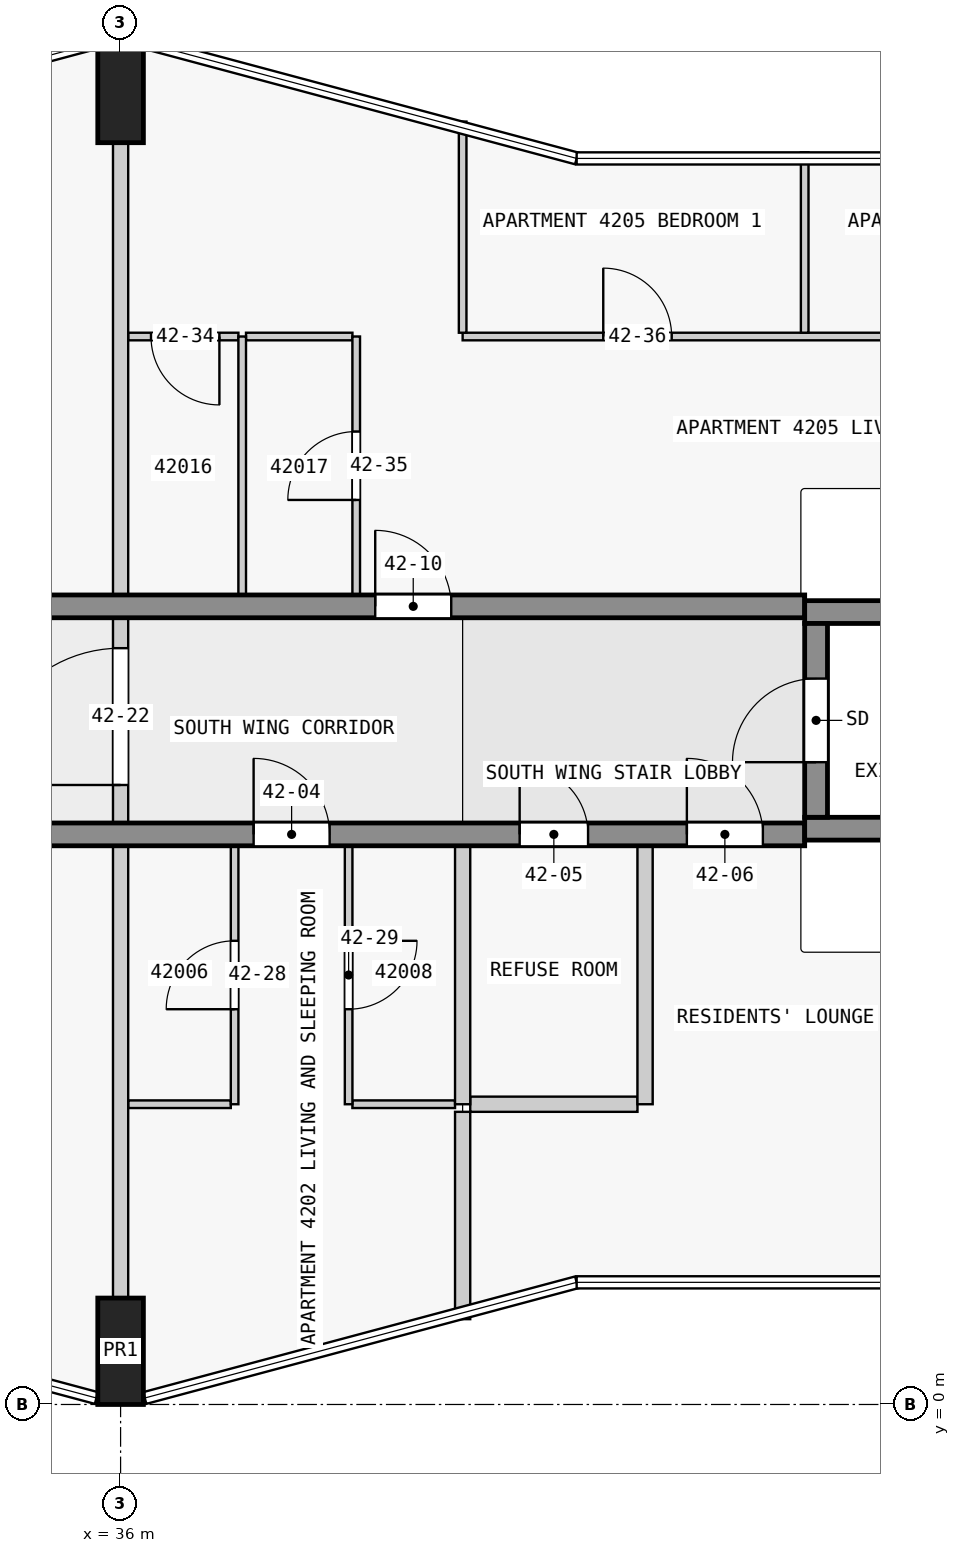
"""IFC4 building model, lengths in metres.
Left out: names, types, materials, properties, quantities, classifications, styles, units other than length and angle.
Written with IfcOpenShell. Run it as: python <this file> out.ifc"""

import sys

from ifc_helpers import new_model, si_unit, direction, frame, frame_2d, origin, origin_2d, place, context, subcontext, project, spatial, rectangle, extrude, element, fill, save


model = new_model("IFC4")
c1 = context("Model", 3, precision=1e-05, world=origin(), true_north=direction((0.0, 1.0)))
c2 = subcontext(c1, "Body", "Model", "MODEL_VIEW")
j1 = project(units=[si_unit("LENGTHUNIT", "METRE"), si_unit("PLANEANGLEUNIT", "RADIAN")], contexts=[c1])
p1 = place(None, origin())
s1 = spatial("IfcSite", under=j1, at=p1, CompositionType="ELEMENT")
p2 = place(p1, origin())
s2 = spatial("IfcBuilding", under=s1, at=p2, CompositionType="ELEMENT")
p3 = place(p2, frame((0.0, 0.0, 163.9)))
s3 = spatial("IfcBuildingStorey", under=s2, at=p3, CompositionType="ELEMENT", Elevation=163.9)
for number, where, z_axis, x_axis in (
    (1, (36.0, 0.7, 0.0), (0.0, 0.0, 1.0), (1.0, 0.0, 0.0)),
    (2, (36.0, 17.3, 0.0), (0.0, 0.0, 1.0), (1.0, 0.0, 0.0)),
):
    element("IfcColumn", number, at=place(p3, frame(where, z_axis=z_axis, x_axis=x_axis)), inside=s3, PredefinedType="COLUMN", context=c2, shape_type="SweptSolid", body=[
        extrude(rectangle(XDim=0.6, YDim=1.4, at=origin_2d()), origin(), (0.0, 0.0, 1.0), 3.5),
    ])
p4 = place(p3, frame((45.15, 7.725, 0.0), z_axis=(0.0, 0.0, 1.0), x_axis=(0.0, 1.0, 0.0)))
e3 = element("IfcWall", 3, at=p4, inside=s3, PredefinedType="SHEAR", context=c2, shape_type="SweptSolid", body=[
    extrude(rectangle(XDim=2.55, YDim=0.3, at=frame_2d((1.275, 0.0))), origin(), (0.0, 0.0, 1.0), 3.5),
])
p5 = place(p4, frame((0.725, 0.0, 0.0)))
e4 = element("IfcOpeningElement", 4, at=p5, cuts=e3, PredefinedType="OPENING", context=c2, shape_type="SweptSolid", body=[
    extrude(rectangle(XDim=1.1, YDim=2.1, at=frame_2d((0.55, 1.05))), frame((0.0, 0.16, 0.0), z_axis=(0.0, -1.0, 0.0), x_axis=(1.0, 0.0, 0.0)), (0.0, 0.0, 1.0), 0.32),
])
for number, where, z_axis, x_axis in (
    (5, (45.0, 7.575, 0.0), (0.0, 0.0, 1.0), (1.0, 0.0, 0.0)),
    (6, (45.0, 10.425, 0.0), (0.0, 0.0, 1.0), (1.0, 0.0, 0.0)),
):
    element("IfcWall", number, at=place(p3, frame(where, z_axis=z_axis, x_axis=x_axis)), inside=s3, PredefinedType="SHEAR", context=c2, shape_type="SweptSolid", body=[
        extrude(rectangle(XDim=7.2, YDim=0.3, at=frame_2d((3.6, 0.0))), origin(), (0.0, 0.0, 1.0), 3.5),
    ])
p6 = place(p3, frame((22.5, 7.5, 0.0), z_axis=(0.0, 0.0, 1.0), x_axis=(1.0, 0.0, 0.0)))
e7 = element("IfcWall", 7, at=p6, inside=s3, PredefinedType="SHEAR", context=c2, shape_type="SweptSolid", body=[
    extrude(rectangle(XDim=22.5, YDim=0.3, at=frame_2d((11.25, 0.0))), origin(), (0.0, 0.0, 1.0), 3.25),
])
p7 = place(p6, frame((1.75, 0.0, 0.0)))
e8 = element("IfcOpeningElement", 8, at=p7, cuts=e7, PredefinedType="OPENING", context=c2, shape_type="SweptSolid", body=[
    extrude(rectangle(XDim=1.0, YDim=2.1, at=frame_2d((0.5, 1.05))), frame((0.0, 0.16, 0.0), z_axis=(0.0, -1.0, 0.0), x_axis=(1.0, 0.0, 0.0)), (0.0, 0.0, 1.0), 0.32),
])
p8 = place(p6, frame((6.25, 0.0, 0.0)))
e9 = element("IfcOpeningElement", 9, at=p8, cuts=e7, PredefinedType="OPENING", context=c2, shape_type="SweptSolid", body=[
    extrude(rectangle(XDim=1.0, YDim=2.1, at=frame_2d((0.5, 1.05))), frame((0.0, 0.16, 0.0), z_axis=(0.0, -1.0, 0.0), x_axis=(1.0, 0.0, 0.0)), (0.0, 0.0, 1.0), 0.32),
])
p9 = place(p6, frame((10.75, 0.0, 0.0)))
e10 = element("IfcOpeningElement", 10, at=p9, cuts=e7, PredefinedType="OPENING", context=c2, shape_type="SweptSolid", body=[
    extrude(rectangle(XDim=1.0, YDim=2.1, at=frame_2d((0.5, 1.05))), frame((0.0, 0.16, 0.0), z_axis=(0.0, -1.0, 0.0), x_axis=(1.0, 0.0, 0.0)), (0.0, 0.0, 1.0), 0.32),
])
p10 = place(p6, frame((15.25, 0.0, 0.0)))
e11 = element("IfcOpeningElement", 11, at=p10, cuts=e7, PredefinedType="OPENING", context=c2, shape_type="SweptSolid", body=[
    extrude(rectangle(XDim=1.0, YDim=2.1, at=frame_2d((0.5, 1.05))), frame((0.0, 0.16, 0.0), z_axis=(0.0, -1.0, 0.0), x_axis=(1.0, 0.0, 0.0)), (0.0, 0.0, 1.0), 0.32),
])
p11 = place(p6, frame((18.75, 0.0, 0.0)))
e12 = element("IfcOpeningElement", 12, at=p11, cuts=e7, PredefinedType="OPENING", context=c2, shape_type="SweptSolid", body=[
    extrude(rectangle(XDim=0.9, YDim=2.1, at=frame_2d((0.45, 1.05))), frame((0.0, 0.16, 0.0), z_axis=(0.0, -1.0, 0.0), x_axis=(1.0, 0.0, 0.0)), (0.0, 0.0, 1.0), 0.32),
])
p12 = place(p6, frame((20.95, 0.0, 0.0)))
e13 = element("IfcOpeningElement", 13, at=p12, cuts=e7, PredefinedType="OPENING", context=c2, shape_type="SweptSolid", body=[
    extrude(rectangle(XDim=1.0, YDim=2.1, at=frame_2d((0.5, 1.05))), frame((0.0, 0.16, 0.0), z_axis=(0.0, -1.0, 0.0), x_axis=(1.0, 0.0, 0.0)), (0.0, 0.0, 1.0), 0.32),
])
p13 = place(p3, frame((22.5, 10.5, 0.0), z_axis=(0.0, 0.0, 1.0), x_axis=(1.0, 0.0, 0.0)))
e14 = element("IfcWall", 14, at=p13, inside=s3, PredefinedType="SHEAR", context=c2, shape_type="SweptSolid", body=[
    extrude(rectangle(XDim=22.5, YDim=0.3, at=frame_2d((11.25, 0.0))), origin(), (0.0, 0.0, 1.0), 3.25),
])
p14 = place(p13, frame((1.75, 0.0, 0.0)))
e15 = element("IfcOpeningElement", 15, at=p14, cuts=e14, PredefinedType="OPENING", context=c2, shape_type="SweptSolid", body=[
    extrude(rectangle(XDim=1.0, YDim=2.1, at=frame_2d((0.5, 1.05))), frame((0.0, 0.16, 0.0), z_axis=(0.0, -1.0, 0.0), x_axis=(1.0, 0.0, 0.0)), (0.0, 0.0, 1.0), 0.32),
])
p15 = place(p13, frame((6.25, 0.0, 0.0)))
e16 = element("IfcOpeningElement", 16, at=p15, cuts=e14, PredefinedType="OPENING", context=c2, shape_type="SweptSolid", body=[
    extrude(rectangle(XDim=1.0, YDim=2.1, at=frame_2d((0.5, 1.05))), frame((0.0, 0.16, 0.0), z_axis=(0.0, -1.0, 0.0), x_axis=(1.0, 0.0, 0.0)), (0.0, 0.0, 1.0), 0.32),
])
p16 = place(p13, frame((10.35, 0.0, 0.0)))
e17 = element("IfcOpeningElement", 17, at=p16, cuts=e14, PredefinedType="OPENING", context=c2, shape_type="SweptSolid", body=[
    extrude(rectangle(XDim=1.8, YDim=2.1, at=frame_2d((0.9, 1.05))), frame((0.0, 0.16, 0.0), z_axis=(0.0, -1.0, 0.0), x_axis=(1.0, 0.0, 0.0)), (0.0, 0.0, 1.0), 0.32),
])
p17 = place(p13, frame((16.85, 0.0, 0.0)))
e18 = element("IfcOpeningElement", 18, at=p17, cuts=e14, PredefinedType="OPENING", context=c2, shape_type="SweptSolid", body=[
    extrude(rectangle(XDim=1.0, YDim=2.1, at=frame_2d((0.5, 1.05))), frame((0.0, 0.16, 0.0), z_axis=(0.0, -1.0, 0.0), x_axis=(1.0, 0.0, 0.0)), (0.0, 0.0, 1.0), 0.32),
])
for number, where, z_axis, x_axis in (
    (19, (36.1, 3.95, 0.0), (0.0, 0.0, 1.0), (1.0, 0.0, 0.0)),
    (20, (39.05, 3.95, 0.0), (0.0, 0.0, 1.0), (1.0, 0.0, 0.0)),
):
    element("IfcWall", number, at=place(p3, frame(where, z_axis=z_axis, x_axis=x_axis)), inside=s3, PredefinedType="PARTITIONING", context=c2, shape_type="SweptSolid", body=[
        extrude(rectangle(XDim=1.35, YDim=0.1, at=frame_2d((0.675, 0.0))), origin(), (0.0, 0.0, 1.0), 3.25),
    ])
p18 = place(p3, frame((40.6, 3.95, 0.0), z_axis=(0.0, 0.0, 1.0), x_axis=(1.0, 0.0, 0.0)))
e21 = element("IfcWall", 21, at=p18, inside=s3, PredefinedType="PARTITIONING", context=c2, shape_type="SweptSolid", body=[
    extrude(rectangle(XDim=2.2, YDim=0.2, at=frame_2d((1.1, 0.0))), origin(), (0.0, 0.0, 1.0), 3.25),
])
p19 = place(p3, frame((37.55, 14.05, 0.0), z_axis=(0.0, 0.0, 1.0), x_axis=(-1.0, 0.0, 0.0)))
e22 = element("IfcWall", 22, at=p19, inside=s3, PredefinedType="PARTITIONING", context=c2, shape_type="SweptSolid", body=[
    extrude(rectangle(XDim=1.45, YDim=0.1, at=frame_2d((0.725, 0.0))), origin(), (0.0, 0.0, 1.0), 3.25),
])
p20 = place(p19, frame((0.25, 0.0, 0.0)))
e23 = element("IfcOpeningElement", 23, at=p20, cuts=e22, PredefinedType="OPENING", context=c2, shape_type="SweptSolid", body=[
    extrude(rectangle(XDim=0.9, YDim=2.1, at=frame_2d((0.45, 1.05))), frame((0.0, 0.06, 0.0), z_axis=(0.0, -1.0, 0.0), x_axis=(1.0, 0.0, 0.0)), (0.0, 0.0, 1.0), 0.12),
])
p21 = place(p3, frame((39.05, 14.05, 0.0), z_axis=(0.0, 0.0, 1.0), x_axis=(-1.0, 0.0, 0.0)))
e24 = element("IfcWall", 24, at=p21, inside=s3, PredefinedType="PARTITIONING", context=c2, shape_type="SweptSolid", body=[
    extrude(rectangle(XDim=1.4, YDim=0.1, at=frame_2d((0.7, 0.0))), origin(), (0.0, 0.0, 1.0), 3.25),
])
p22 = place(p3, frame((40.5, 14.05, 0.0), z_axis=(0.0, 0.0, 1.0), x_axis=(1.0, 0.0, 0.0)))
e25 = element("IfcWall", 25, at=p22, inside=s3, PredefinedType="PARTITIONING", context=c2, shape_type="SweptSolid", body=[
    extrude(rectangle(XDim=13.58, YDim=0.1, at=frame_2d((6.79, 0.0))), origin(), (0.0, 0.0, 1.0), 3.25),
])
p23 = place(p22, frame((1.85, 0.0, 0.0)))
e26 = element("IfcOpeningElement", 26, at=p23, cuts=e25, PredefinedType="OPENING", context=c2, shape_type="SweptSolid", body=[
    extrude(rectangle(XDim=0.9, YDim=2.1, at=frame_2d((0.45, 1.05))), frame((0.0, 0.06, 0.0), z_axis=(0.0, -1.0, 0.0), x_axis=(1.0, 0.0, 0.0)), (0.0, 0.0, 1.0), 0.12),
])
p24 = place(p22, frame((6.35, 0.0, 0.0)))
e27 = element("IfcOpeningElement", 27, at=p24, cuts=e25, PredefinedType="OPENING", context=c2, shape_type="SweptSolid", body=[
    extrude(rectangle(XDim=0.9, YDim=2.1, at=frame_2d((0.45, 1.05))), frame((0.0, 0.06, 0.0), z_axis=(0.0, -1.0, 0.0), x_axis=(1.0, 0.0, 0.0)), (0.0, 0.0, 1.0), 0.12),
])
p25 = place(p22, frame((10.65, 0.0, 0.0)))
e28 = element("IfcOpeningElement", 28, at=p25, cuts=e25, PredefinedType="OPENING", context=c2, shape_type="SweptSolid", body=[
    extrude(rectangle(XDim=0.9, YDim=2.1, at=frame_2d((0.45, 1.05))), frame((0.0, 0.06, 0.0), z_axis=(0.0, -1.0, 0.0), x_axis=(1.0, 0.0, 0.0)), (0.0, 0.0, 1.0), 0.12),
])
for number, where, z_axis, x_axis in (
    (29, (36.0, 1.4, 0.0), (0.0, 0.0, 1.0), (0.0, 1.0, 0.0)),
    (30, (36.0, 10.65, 0.0), (0.0, 0.0, 1.0), (0.0, 1.0, 0.0)),
):
    element("IfcWall", number, at=place(p3, frame(where, z_axis=z_axis, x_axis=x_axis)), inside=s3, PredefinedType="PARTITIONING", context=c2, shape_type="SweptSolid", body=[
        extrude(rectangle(XDim=5.95, YDim=0.2, at=frame_2d((2.975, 0.0))), origin(), (0.0, 0.0, 1.0), 3.25),
    ])
p26 = place(p3, frame((37.5, 3.95, 0.0), z_axis=(0.0, 0.0, 1.0), x_axis=(0.0, 1.0, 0.0)))
e31 = element("IfcWall", 31, at=p26, inside=s3, PredefinedType="PARTITIONING", context=c2, shape_type="SweptSolid", body=[
    extrude(rectangle(XDim=3.4, YDim=0.1, at=frame_2d((1.7, 0.0))), origin(), (0.0, 0.0, 1.0), 3.25),
])
p27 = place(p26, frame((1.25, 0.0, 0.0)))
e32 = element("IfcOpeningElement", 32, at=p27, cuts=e31, PredefinedType="OPENING", context=c2, shape_type="SweptSolid", body=[
    extrude(rectangle(XDim=0.9, YDim=2.1, at=frame_2d((0.45, 1.05))), frame((0.0, 0.06, 0.0), z_axis=(0.0, -1.0, 0.0), x_axis=(1.0, 0.0, 0.0)), (0.0, 0.0, 1.0), 0.12),
])
p28 = place(p3, frame((37.6, 10.65, 0.0), z_axis=(0.0, 0.0, 1.0), x_axis=(0.0, 1.0, 0.0)))
e33 = element("IfcWall", 33, at=p28, inside=s3, PredefinedType="PARTITIONING", context=c2, shape_type="SweptSolid", body=[
    extrude(rectangle(XDim=3.4, YDim=0.1, at=frame_2d((1.7, 0.0))), origin(), (0.0, 0.0, 1.0), 3.25),
])
p29 = place(p3, frame((39.0, 7.35, 0.0), z_axis=(0.0, 0.0, 1.0), x_axis=(0.0, -1.0, 0.0)))
e34 = element("IfcWall", 34, at=p29, inside=s3, PredefinedType="PARTITIONING", context=c2, shape_type="SweptSolid", body=[
    extrude(rectangle(XDim=3.4, YDim=0.1, at=frame_2d((1.7, 0.0))), origin(), (0.0, 0.0, 1.0), 3.25),
])
p30 = place(p29, frame((1.25, 0.0, 0.0)))
e35 = element("IfcOpeningElement", 35, at=p30, cuts=e34, PredefinedType="OPENING", context=c2, shape_type="SweptSolid", body=[
    extrude(rectangle(XDim=0.9, YDim=2.1, at=frame_2d((0.45, 1.05))), frame((0.0, 0.06, 0.0), z_axis=(0.0, -1.0, 0.0), x_axis=(1.0, 0.0, 0.0)), (0.0, 0.0, 1.0), 0.12),
])
p31 = place(p3, frame((39.1, 10.65, 0.0), z_axis=(0.0, 0.0, 1.0), x_axis=(0.0, 1.0, 0.0)))
e36 = element("IfcWall", 36, at=p31, inside=s3, PredefinedType="PARTITIONING", context=c2, shape_type="SweptSolid", body=[
    extrude(rectangle(XDim=3.4, YDim=0.1, at=frame_2d((1.7, 0.0))), origin(), (0.0, 0.0, 1.0), 3.25),
])
p32 = place(p31, frame((1.25, 0.0, 0.0)))
e37 = element("IfcOpeningElement", 37, at=p32, cuts=e36, PredefinedType="OPENING", context=c2, shape_type="SweptSolid", body=[
    extrude(rectangle(XDim=0.9, YDim=2.1, at=frame_2d((0.45, 1.05))), frame((0.0, 0.06, 0.0), z_axis=(0.0, -1.0, 0.0), x_axis=(1.0, 0.0, 0.0)), (0.0, 0.0, 1.0), 0.12),
])
p33 = place(p3, frame((40.5, 16.878, 0.0), z_axis=(0.0, 0.0, 1.0), x_axis=(0.0, -1.0, 0.0)))
e38 = element("IfcWall", 38, at=p33, inside=s3, PredefinedType="PARTITIONING", context=c2, shape_type="SweptSolid", body=[
    extrude(rectangle(XDim=2.778, YDim=0.1, at=frame_2d((1.389, 0.0))), origin(), (0.0, 0.0, 1.0), 3.25),
])
p34 = place(p3, frame((40.5, 3.85, 0.0), z_axis=(0.0, 0.0, 1.0), x_axis=(0.0, -1.0, 0.0)))
e39 = element("IfcWall", 39, at=p34, inside=s3, PredefinedType="PARTITIONING", context=c2, shape_type="SweptSolid", body=[
    extrude(rectangle(XDim=2.728, YDim=0.2, at=frame_2d((1.364, 0.0))), origin(), (0.0, 0.0, 1.0), 3.25),
])
for number, where, z_axis, x_axis in (
    (40, (40.5, 3.95, 0.0), (0.0, 0.0, 1.0), (0.0, 1.0, 0.0)),
    (41, (42.9, 3.95, 0.0), (0.0, 0.0, 1.0), (0.0, 1.0, 0.0)),
):
    element("IfcWall", number, at=place(p3, frame(where, z_axis=z_axis, x_axis=x_axis)), inside=s3, PredefinedType="PARTITIONING", context=c2, shape_type="SweptSolid", body=[
        extrude(rectangle(XDim=3.4, YDim=0.2, at=frame_2d((1.7, 0.0))), origin(), (0.0, 0.0, 1.0), 3.25),
    ])
p35 = place(p3, frame((45.0, 14.1, 0.0), z_axis=(0.0, 0.0, 1.0), x_axis=(0.0, 1.0, 0.0)))
e42 = element("IfcWall", 42, at=p35, inside=s3, PredefinedType="PARTITIONING", context=c2, shape_type="SweptSolid", body=[
    extrude(rectangle(XDim=2.373, YDim=0.1, at=frame_2d((1.187, 0.0))), origin(), (0.0, 0.0, 1.0), 3.25),
])
p36 = place(p3, frame((36.0, 7.45, 0.0), z_axis=(0.0, 0.0, 1.0), x_axis=(0.0, 1.0, 0.0)))
e43 = element("IfcWall", 43, at=p36, inside=s3, PredefinedType="PARTITIONING", context=c2, shape_type="SweptSolid", body=[
    extrude(rectangle(XDim=3.1, YDim=0.2, at=frame_2d((1.55, 0.0))), origin(), (0.0, 0.0, 1.0), 3.25),
])
p37 = place(p36, frame((0.7, 0.0, 0.0)))
e44 = element("IfcOpeningElement", 44, at=p37, cuts=e43, PredefinedType="OPENING", context=c2, shape_type="SweptSolid", body=[
    extrude(rectangle(XDim=1.8, YDim=2.1, at=frame_2d((0.9, 1.05))), frame((0.0, 0.11, 0.0), z_axis=(0.0, -1.0, 0.0), x_axis=(1.0, 0.0, 0.0)), (0.0, 0.0, 1.0), 0.22),
])
p38 = place(p5, origin())
e45 = element("IfcDoor", 45, at=p38, inside=s3, OperationType="SINGLE_SWING_LEFT", PredefinedType="DOOR", context=c2, shape_type="SweptSolid", body=[
    extrude(rectangle(XDim=1.1, YDim=2.1, at=frame_2d((0.55, 1.05))), frame((0.0, 0.025, 0.0), z_axis=(0.0, -1.0, 0.0), x_axis=(1.0, 0.0, 0.0)), (0.0, 0.0, 1.0), 0.05),
])
fill(e4, e45)
p39 = place(p10, origin())
e46 = element("IfcDoor", 46, at=p39, inside=s3, OperationType="SINGLE_SWING_RIGHT", PredefinedType="DOOR", context=c2, shape_type="SweptSolid", body=[
    extrude(rectangle(XDim=1.0, YDim=2.1, at=frame_2d((0.5, 1.05))), frame((0.0, 0.025, 0.0), z_axis=(0.0, -1.0, 0.0), x_axis=(1.0, 0.0, 0.0)), (0.0, 0.0, 1.0), 0.05),
])
fill(e11, e46)
p40 = place(p11, origin())
e47 = element("IfcDoor", 47, at=p40, inside=s3, OperationType="SINGLE_SWING_RIGHT", PredefinedType="DOOR", context=c2, shape_type="SweptSolid", body=[
    extrude(rectangle(XDim=0.9, YDim=2.1, at=frame_2d((0.45, 1.05))), frame((0.0, 0.025, 0.0), z_axis=(0.0, -1.0, 0.0), x_axis=(1.0, 0.0, 0.0)), (0.0, 0.0, 1.0), 0.05),
])
fill(e12, e47)
p41 = place(p12, origin())
e48 = element("IfcDoor", 48, at=p41, inside=s3, OperationType="SINGLE_SWING_RIGHT", PredefinedType="DOOR", context=c2, shape_type="SweptSolid", body=[
    extrude(rectangle(XDim=1.0, YDim=2.1, at=frame_2d((0.5, 1.05))), frame((0.0, 0.025, 0.0), z_axis=(0.0, -1.0, 0.0), x_axis=(1.0, 0.0, 0.0)), (0.0, 0.0, 1.0), 0.05),
])
fill(e13, e48)
p42 = place(p17, origin())
e49 = element("IfcDoor", 49, at=p42, inside=s3, OperationType="SINGLE_SWING_RIGHT", PredefinedType="DOOR", context=c2, shape_type="SweptSolid", body=[
    extrude(rectangle(XDim=1.0, YDim=2.1, at=frame_2d((0.5, 1.05))), frame((0.0, 0.025, 0.0), z_axis=(0.0, -1.0, 0.0), x_axis=(1.0, 0.0, 0.0)), (0.0, 0.0, 1.0), 0.05),
])
fill(e18, e49)
p43 = place(p37, origin())
e50 = element("IfcDoor", 50, at=p43, inside=s3, OperationType="SINGLE_SWING_RIGHT", PredefinedType="DOOR", context=c2, shape_type="SweptSolid", body=[
    extrude(rectangle(XDim=1.8, YDim=2.1, at=frame_2d((0.9, 1.05))), frame((0.0, 0.025, 0.0), z_axis=(0.0, -1.0, 0.0), x_axis=(1.0, 0.0, 0.0)), (0.0, 0.0, 1.0), 0.05),
])
fill(e44, e50)
p44 = place(p27, origin())
e51 = element("IfcDoor", 51, at=p44, inside=s3, OperationType="SINGLE_SWING_RIGHT", PredefinedType="DOOR", context=c2, shape_type="SweptSolid", body=[
    extrude(rectangle(XDim=0.9, YDim=2.1, at=frame_2d((0.45, 1.05))), frame((0.0, 0.025, 0.0), z_axis=(0.0, -1.0, 0.0), x_axis=(1.0, 0.0, 0.0)), (0.0, 0.0, 1.0), 0.05),
])
fill(e32, e51)
p45 = place(p30, origin())
e52 = element("IfcDoor", 52, at=p45, inside=s3, OperationType="SINGLE_SWING_RIGHT", PredefinedType="DOOR", context=c2, shape_type="SweptSolid", body=[
    extrude(rectangle(XDim=0.9, YDim=2.1, at=frame_2d((0.45, 1.05))), frame((0.0, 0.025, 0.0), z_axis=(0.0, -1.0, 0.0), x_axis=(1.0, 0.0, 0.0)), (0.0, 0.0, 1.0), 0.05),
])
fill(e35, e52)
p46 = place(p20, origin())
e53 = element("IfcDoor", 53, at=p46, inside=s3, OperationType="SINGLE_SWING_LEFT", PredefinedType="DOOR", context=c2, shape_type="SweptSolid", body=[
    extrude(rectangle(XDim=0.9, YDim=2.1, at=frame_2d((0.45, 1.05))), frame((0.0, 0.025, 0.0), z_axis=(0.0, -1.0, 0.0), x_axis=(1.0, 0.0, 0.0)), (0.0, 0.0, 1.0), 0.05),
])
fill(e23, e53)
p47 = place(p32, origin())
e54 = element("IfcDoor", 54, at=p47, inside=s3, OperationType="SINGLE_SWING_LEFT", PredefinedType="DOOR", context=c2, shape_type="SweptSolid", body=[
    extrude(rectangle(XDim=0.9, YDim=2.1, at=frame_2d((0.45, 1.05))), frame((0.0, 0.025, 0.0), z_axis=(0.0, -1.0, 0.0), x_axis=(1.0, 0.0, 0.0)), (0.0, 0.0, 1.0), 0.05),
])
fill(e37, e54)
p48 = place(p23, origin())
e55 = element("IfcDoor", 55, at=p48, inside=s3, OperationType="SINGLE_SWING_LEFT", PredefinedType="DOOR", context=c2, shape_type="SweptSolid", body=[
    extrude(rectangle(XDim=0.9, YDim=2.1, at=frame_2d((0.45, 1.05))), frame((0.0, 0.025, 0.0), z_axis=(0.0, -1.0, 0.0), x_axis=(1.0, 0.0, 0.0)), (0.0, 0.0, 1.0), 0.05),
])
fill(e26, e55)
save(model, sys.argv[1])
